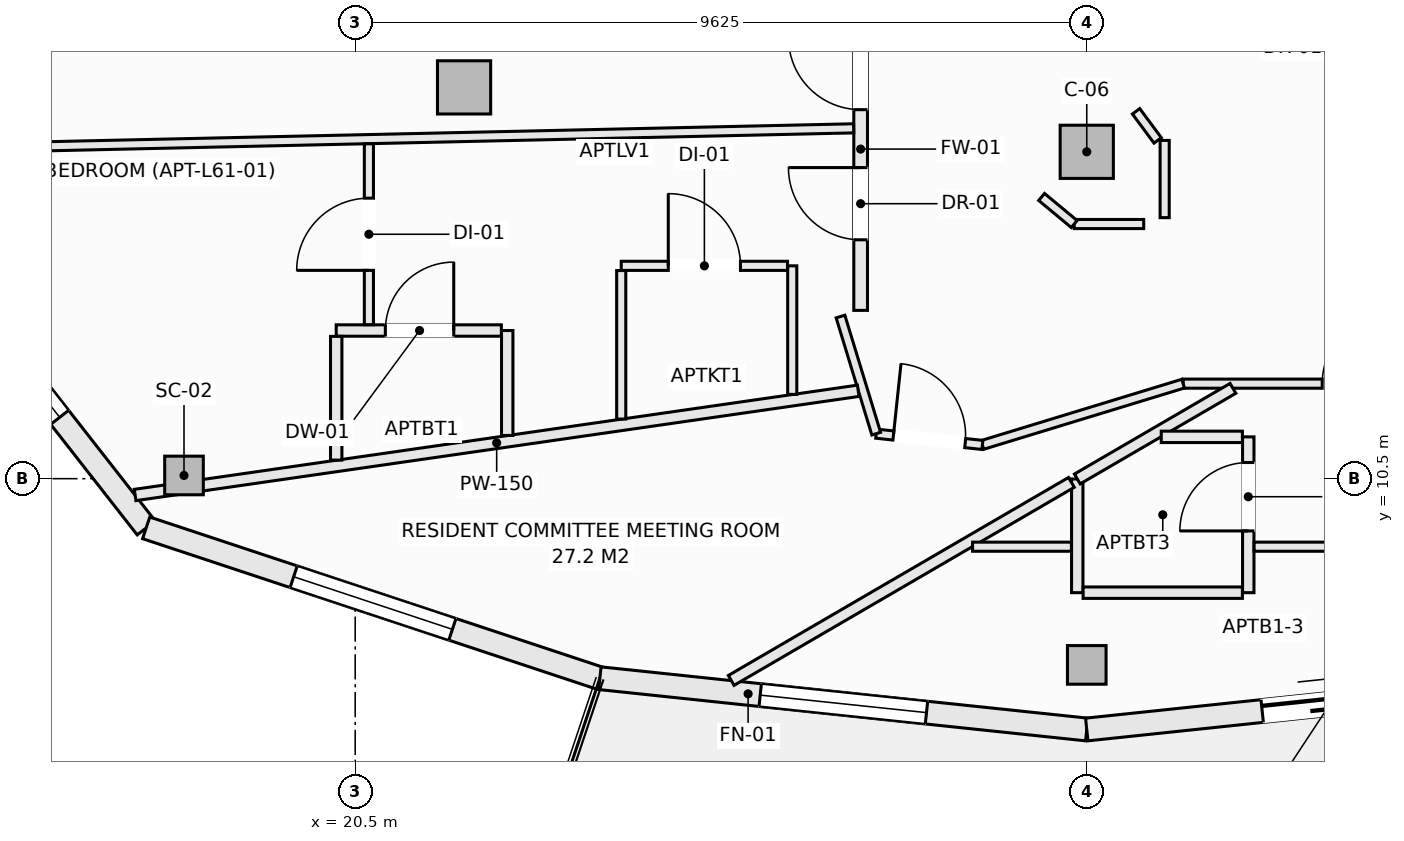
"""IFC4 building model, lengths in metres.
Left out: names, types, materials, properties, quantities, classifications, styles, units other than length and angle.
Written with IfcOpenShell. Run it as: python <this file> out.ifc"""

import sys

from ifc_helpers import new_model, si_unit, direction, frame, frame_2d, origin, origin_2d, place, context, subcontext, project, spatial, rectangle, hollow_rectangle, extrude, element, fill, save


model = new_model("IFC4")
c1 = context("Model", 3, precision=1e-05, world=origin(), true_north=direction((0.0, 1.0)))
c2 = subcontext(c1, "Body", "Model", "MODEL_VIEW")
j1 = project(units=[si_unit("LENGTHUNIT", "METRE"), si_unit("PLANEANGLEUNIT", "RADIAN")], contexts=[c1])
p1 = place(None, origin())
s1 = spatial("IfcSite", under=j1, at=p1, CompositionType="ELEMENT")
p2 = place(p1, origin())
s2 = spatial("IfcBuilding", under=s1, at=p2, CompositionType="ELEMENT")
p3 = place(p2, frame((0.0, 0.0, 229.4)))
s3 = spatial("IfcBuildingStorey", under=s2, at=p3, CompositionType="ELEMENT", Elevation=229.4)
for number, where, z_axis, x_axis in (
    (1, (18.247, 10.542, -0.27), (0.0, 0.0, 1.0), (1.0, 0.0, 0.0)),
    (2, (30.125, 8.05, -0.27), (0.0, 0.0, 1.0), (1.0, 0.0, 0.0)),
):
    element("IfcColumn", number, at=place(p3, frame(where, z_axis=z_axis, x_axis=x_axis)), inside=s3, PredefinedType="COLUMN", context=c2, shape_type="SweptSolid", body=[
        extrude(hollow_rectangle(XDim=0.508, YDim=0.508, WallThickness=0.019, at=origin_2d()), origin(), (0.0, 0.0, 1.0), 3.3),
    ])
for number, where, z_axis, x_axis in (
    (3, (21.932, 15.648, -0.27), (0.0, 0.0, 1.0), (1.0, 0.0, 0.0)),
    (4, (30.125, 14.8, -0.27), (0.0, 0.0, 1.0), (1.0, 0.0, 0.0)),
):
    element("IfcColumn", number, at=place(p3, frame(where, z_axis=z_axis, x_axis=x_axis)), inside=s3, PredefinedType="COLUMN", context=c2, shape_type="SweptSolid", body=[
        extrude(rectangle(XDim=0.7, YDim=0.7, at=origin_2d()), origin(), (0.0, 0.0, 1.0), 3.3),
    ])
p4 = place(p3, frame((14.117, 14.493, 0.0), z_axis=(0.0, 0.0, 1.0), x_axis=(0.616450126935, -0.787393955401, 0.0)))
e5 = element("IfcWall", 5, at=p4, inside=s3, PredefinedType="SOLIDWALL", context=c2, shape_type="SweptSolid", body=[
    extrude(rectangle(XDim=5.893, YDim=0.3, at=frame_2d((2.946, 0.0))), origin(), (0.0, 0.0, 1.0), 2.605),
])
p5 = place(p4, frame((1.846, 0.0, 0.72)))
e6 = element("IfcOpeningElement", 6, at=p5, cuts=e5, PredefinedType="OPENING", context=c2, shape_type="SweptSolid", body=[
    extrude(rectangle(XDim=2.2, YDim=1.65, at=frame_2d((1.1, 0.825))), frame((0.0, 0.16, 0.0), z_axis=(0.0, -1.0, 0.0), x_axis=(1.0, 0.0, 0.0)), (0.0, 0.0, 1.0), 0.32),
])
p6 = place(p3, frame((17.75, 9.853, 0.0), z_axis=(0.0, 0.0, 1.0), x_axis=(0.949240877604, -0.314550085495, 0.0)))
e7 = element("IfcWall", 7, at=p6, inside=s3, PredefinedType="SOLIDWALL", context=c2, shape_type="SweptSolid", body=[
    extrude(rectangle(XDim=6.288, YDim=0.3, at=frame_2d((3.144, 0.0))), origin(), (0.0, 0.0, 1.0), 2.605),
])
p7 = place(p6, frame((2.044, 0.0, 0.72)))
e8 = element("IfcOpeningElement", 8, at=p7, cuts=e7, PredefinedType="OPENING", context=c2, shape_type="SweptSolid", body=[
    extrude(rectangle(XDim=2.2, YDim=1.65, at=frame_2d((1.1, 0.825))), frame((0.0, 0.16, 0.0), z_axis=(0.0, -1.0, 0.0), x_axis=(1.0, 0.0, 0.0)), (0.0, 0.0, 1.0), 0.32),
])
p8 = place(p3, frame((23.719, 7.875, 0.0), z_axis=(0.0, 0.0, 1.0), x_axis=(0.994497142298, -0.104763705363, 0.0)))
e9 = element("IfcWall", 9, at=p8, inside=s3, PredefinedType="SOLIDWALL", context=c2, shape_type="SweptSolid", body=[
    extrude(rectangle(XDim=6.441, YDim=0.3, at=frame_2d((3.221, 0.0))), origin(), (0.0, 0.0, 1.0), 2.605),
])
p9 = place(p8, frame((2.121, 0.0, 0.72)))
e10 = element("IfcOpeningElement", 10, at=p9, cuts=e9, PredefinedType="OPENING", context=c2, shape_type="SweptSolid", body=[
    extrude(rectangle(XDim=2.2, YDim=1.65, at=frame_2d((1.1, 0.825))), frame((0.0, 0.16, 0.0), z_axis=(0.0, -1.0, 0.0), x_axis=(1.0, 0.0, 0.0)), (0.0, 0.0, 1.0), 0.32),
])
p10 = place(p3, frame((30.125, 7.2, 0.0), z_axis=(0.0, 0.0, 1.0), x_axis=(0.994497142298, 0.104763705363, 0.0)))
e11 = element("IfcWall", 11, at=p10, inside=s3, PredefinedType="SOLIDWALL", context=c2, shape_type="SweptSolid", body=[
    extrude(rectangle(XDim=6.441, YDim=0.3, at=frame_2d((3.221, 0.0))), origin(), (0.0, 0.0, 1.0), 2.605),
])
p11 = place(p10, frame((2.321, 0.0, 0.0)))
e12 = element("IfcOpeningElement", 12, at=p11, cuts=e11, PredefinedType="OPENING", context=c2, shape_type="SweptSolid", body=[
    extrude(rectangle(XDim=1.8, YDim=2.25, at=frame_2d((0.9, 1.125))), frame((0.0, 0.16, 0.0), z_axis=(0.0, -1.0, 0.0), x_axis=(1.0, 0.0, 0.0)), (0.0, 0.0, 1.0), 0.32),
])
p12 = place(p3, frame((27.15, 12.714, 0.0), z_axis=(0.0, 0.0, 1.0), x_axis=(0.0, 1.0, 0.0)))
e13 = element("IfcWall", 13, at=p12, inside=s3, PredefinedType="SOLIDWALL", context=c2, shape_type="SweptSolid", body=[
    extrude(rectangle(XDim=4.244, YDim=0.18, at=frame_2d((2.122, 0.0))), origin(), (0.0, 0.0, 1.0), 3.03),
])
p13 = place(p12, frame((0.928, 0.0, 0.0)))
e14 = element("IfcOpeningElement", 14, at=p13, cuts=e13, PredefinedType="OPENING", context=c2, shape_type="SweptSolid", body=[
    extrude(rectangle(XDim=0.95, YDim=2.1, at=frame_2d((0.475, 1.05))), frame((0.0, 0.1, 0.0), z_axis=(0.0, -1.0, 0.0), x_axis=(1.0, 0.0, 0.0)), (0.0, 0.0, 1.0), 0.2),
])
p14 = place(p12, frame((2.64, 0.0, 0.0)))
e15 = element("IfcOpeningElement", 15, at=p14, cuts=e13, PredefinedType="OPENING", context=c2, shape_type="SweptSolid", body=[
    extrude(rectangle(XDim=0.95, YDim=2.1, at=frame_2d((0.475, 1.05))), frame((0.0, 0.1, 0.0), z_axis=(0.0, -1.0, 0.0), x_axis=(1.0, 0.0, 0.0)), (0.0, 0.0, 1.0), 0.2),
])
p15 = place(p3, frame((30.0, 9.0, 0.0), z_axis=(0.0, 0.0, 1.0), x_axis=(0.0, 1.0, 0.0)))
e16 = element("IfcWall", 16, at=p15, inside=s3, PredefinedType="PARTITIONING", context=c2, shape_type="SweptSolid", body=[
    extrude(rectangle(XDim=1.496, YDim=0.15, at=frame_2d((0.748, 0.0))), origin(), (0.0, 0.0, 1.0), 2.77),
])
p16 = place(p3, frame((31.393, 11.75, 0.0), z_axis=(0.0, 0.0, 1.0), x_axis=(1.0, 0.0, 0.0)))
e17 = element("IfcWall", 17, at=p16, inside=s3, PredefinedType="PARTITIONING", context=c2, shape_type="SweptSolid", body=[
    extrude(rectangle(XDim=4.495, YDim=0.12, at=frame_2d((2.248, 0.0))), origin(), (0.0, 0.0, 1.0), 3.03),
])
p17 = place(p16, frame((1.83, 0.0, 0.0)))
e18 = element("IfcOpeningElement", 18, at=p17, cuts=e17, PredefinedType="OPENING", context=c2, shape_type="SweptSolid", body=[
    extrude(rectangle(XDim=0.95, YDim=2.1, at=frame_2d((0.475, 1.05))), frame((0.0, 0.07, 0.0), z_axis=(0.0, -1.0, 0.0), x_axis=(1.0, 0.0, 0.0)), (0.0, 0.0, 1.0), 0.14),
])
p18 = place(p3, frame((28.752, 10.944, 0.0), z_axis=(0.0, 0.0, 1.0), x_axis=(0.956462690075, 0.291854625618, 0.0)))
e19 = element("IfcWall", 19, at=p18, inside=s3, PredefinedType="PARTITIONING", context=c2, shape_type="SweptSolid", body=[
    extrude(rectangle(XDim=2.761, YDim=0.12, at=frame_2d((1.381, 0.0))), origin(), (0.0, 0.0, 1.0), 3.03),
])
p19 = place(p3, frame((27.355, 11.092, 0.0), z_axis=(0.0, 0.0, 1.0), x_axis=(0.994438591301, -0.105318033263, 0.0)))
e20 = element("IfcWall", 20, at=p19, inside=s3, PredefinedType="PARTITIONING", context=c2, shape_type="SweptSolid", body=[
    extrude(rectangle(XDim=1.405, YDim=0.12, at=frame_2d((0.702, 0.0))), origin(), (0.0, 0.0, 1.0), 3.03),
])
p20 = place(p19, frame((0.227, 0.0, 0.0)))
e21 = element("IfcOpeningElement", 21, at=p20, cuts=e20, PredefinedType="OPENING", context=c2, shape_type="SweptSolid", body=[
    extrude(rectangle(XDim=0.95, YDim=2.1, at=frame_2d((0.475, 1.05))), frame((0.0, 0.07, 0.0), z_axis=(0.0, -1.0, 0.0), x_axis=(1.0, 0.0, 0.0)), (0.0, 0.0, 1.0), 0.14),
])
p21 = place(p3, frame((26.885, 12.633, 0.0), z_axis=(0.0, 0.0, 1.0), x_axis=(0.291710302586, -0.956506716843, 0.0)))
e22 = element("IfcWall", 22, at=p21, inside=s3, PredefinedType="PARTITIONING", context=c2, shape_type="SweptSolid", body=[
    extrude(rectangle(XDim=1.611, YDim=0.12, at=frame_2d((0.806, 0.0))), origin(), (0.0, 0.0, 1.0), 3.03),
])
p22 = place(p3, frame((29.96, 13.85, 0.0), z_axis=(0.0, 0.0, 1.0), x_axis=(1.0, 0.0, 0.0)))
e23 = element("IfcWall", 23, at=p22, inside=s3, PredefinedType="PARTITIONING", context=c2, shape_type="SweptSolid", body=[
    extrude(rectangle(XDim=0.914, YDim=0.12, at=frame_2d((0.457, 0.0))), origin(), (0.0, 0.0, 1.0), 3.03),
])
p23 = place(p3, frame((31.15, 13.934, 0.0), z_axis=(0.0, 0.0, 1.0), x_axis=(0.0, 1.0, 0.0)))
e24 = element("IfcWall", 24, at=p23, inside=s3, PredefinedType="PARTITIONING", context=c2, shape_type="SweptSolid", body=[
    extrude(rectangle(XDim=1.016, YDim=0.12, at=frame_2d((0.508, 0.0))), origin(), (0.0, 0.0, 1.0), 3.03),
])
p24 = place(p3, frame((30.774, 15.333, 0.0), z_axis=(0.0, 0.0, 1.0), x_axis=(0.595814974861, -0.803121731577, 0.0)))
e25 = element("IfcWall", 25, at=p24, inside=s3, PredefinedType="PARTITIONING", context=c2, shape_type="SweptSolid", body=[
    extrude(rectangle(XDim=0.477, YDim=0.12, at=frame_2d((0.239, 0.0))), origin(), (0.0, 0.0, 1.0), 3.03),
])
p25 = place(p3, frame((29.531, 14.206, 0.0), z_axis=(0.0, 0.0, 1.0), x_axis=(0.7695479554, -0.638589026166, 0.0)))
e26 = element("IfcWall", 26, at=p25, inside=s3, PredefinedType="PARTITIONING", context=c2, shape_type="SweptSolid", body=[
    extrude(rectangle(XDim=0.557, YDim=0.12, at=frame_2d((0.279, 0.0))), origin(), (0.0, 0.0, 1.0), 3.03),
])
p26 = place(p3, frame((13.8, 14.814, 0.0), z_axis=(0.0, 0.0, 1.0), x_axis=(0.999752677802, 0.022239227231, 0.0)))
e27 = element("IfcWall", 27, at=p26, inside=s3, PredefinedType="PARTITIONING", context=c2, shape_type="SweptSolid", body=[
    extrude(rectangle(XDim=13.261, YDim=0.12, at=frame_2d((6.631, 0.0))), origin(), (0.0, 0.0, 1.0), 2.478),
])
p27 = place(p3, frame((17.604, 10.285, 0.0), z_axis=(0.0, 0.0, 1.0), x_axis=(0.989781675617, 0.142591144933, 0.0)))
e28 = element("IfcWall", 28, at=p27, inside=s3, PredefinedType="PARTITIONING", context=c2, shape_type="SweptSolid", body=[
    extrude(rectangle(XDim=9.612, YDim=0.15, at=frame_2d((4.806, 0.0))), origin(), (0.0, 0.0, 1.0), 2.605),
])
p28 = place(p3, frame((26.25, 11.609, 0.0), z_axis=(0.0, 0.0, 1.0), x_axis=(0.0, 1.0, 0.0)))
e29 = element("IfcWall", 29, at=p28, inside=s3, PredefinedType="PARTITIONING", context=c2, shape_type="SweptSolid", body=[
    extrude(rectangle(XDim=1.691, YDim=0.12, at=frame_2d((0.846, 0.0))), origin(), (0.0, 0.0, 1.0), 3.03),
])
p29 = place(p3, frame((24.0, 13.3, 0.0), z_axis=(0.0, 0.0, 1.0), x_axis=(1.0, 0.0, 0.0)))
e30 = element("IfcWall", 30, at=p29, inside=s3, PredefinedType="PARTITIONING", context=c2, shape_type="SweptSolid", body=[
    extrude(rectangle(XDim=2.188, YDim=0.12, at=frame_2d((1.094, 0.0))), origin(), (0.0, 0.0, 1.0), 3.03),
])
p30 = place(p29, frame((0.619, 0.0, 0.0)))
e31 = element("IfcOpeningElement", 31, at=p30, cuts=e30, PredefinedType="OPENING", context=c2, shape_type="SweptSolid", body=[
    extrude(rectangle(XDim=0.95, YDim=2.1, at=frame_2d((0.475, 1.05))), frame((0.0, 0.07, 0.0), z_axis=(0.0, -1.0, 0.0), x_axis=(1.0, 0.0, 0.0)), (0.0, 0.0, 1.0), 0.14),
])
p31 = place(p3, frame((24.0, 11.285, 0.0), z_axis=(0.0, 0.0, 1.0), x_axis=(0.0, 1.0, 0.0)))
e32 = element("IfcWall", 32, at=p31, inside=s3, PredefinedType="PARTITIONING", context=c2, shape_type="SweptSolid", body=[
    extrude(rectangle(XDim=1.953, YDim=0.12, at=frame_2d((0.977, 0.0))), origin(), (0.0, 0.0, 1.0), 3.03),
])
p32 = place(p3, frame((22.5, 11.069, 0.0), z_axis=(0.0, 0.0, 1.0), x_axis=(0.0, 1.0, 0.0)))
e33 = element("IfcWall", 33, at=p32, inside=s3, PredefinedType="PARTITIONING", context=c2, shape_type="SweptSolid", body=[
    extrude(rectangle(XDim=1.38, YDim=0.15, at=frame_2d((0.69, 0.0))), origin(), (0.0, 0.0, 1.0), 3.03),
])
p33 = place(p3, frame((20.25, 12.449, 0.0), z_axis=(0.0, 0.0, 1.0), x_axis=(1.0, 0.0, 0.0)))
e34 = element("IfcWall", 34, at=p33, inside=s3, PredefinedType="PARTITIONING", context=c2, shape_type="SweptSolid", body=[
    extrude(rectangle(XDim=2.173, YDim=0.15, at=frame_2d((1.086, 0.0))), origin(), (0.0, 0.0, 1.0), 3.03),
])
p34 = place(p33, frame((0.646, 0.0, 0.0)))
e35 = element("IfcOpeningElement", 35, at=p34, cuts=e34, PredefinedType="OPENING", context=c2, shape_type="SweptSolid", body=[
    extrude(rectangle(XDim=0.9, YDim=2.1, at=frame_2d((0.45, 1.05))), frame((0.0, 0.085, 0.0), z_axis=(0.0, -1.0, 0.0), x_axis=(1.0, 0.0, 0.0)), (0.0, 0.0, 1.0), 0.17),
])
p35 = place(p3, frame((20.68, 12.526, 0.0), z_axis=(0.0, 0.0, 1.0), x_axis=(0.0, 1.0, 0.0)))
e36 = element("IfcWall", 36, at=p35, inside=s3, PredefinedType="PARTITIONING", context=c2, shape_type="SweptSolid", body=[
    extrude(rectangle(XDim=2.379, YDim=0.12, at=frame_2d((1.189, 0.0))), origin(), (0.0, 0.0, 1.0), 2.478),
])
p36 = place(p35, frame((0.715, 0.0, 0.0)))
e37 = element("IfcOpeningElement", 37, at=p36, cuts=e36, PredefinedType="OPENING", context=c2, shape_type="SweptSolid", body=[
    extrude(rectangle(XDim=0.95, YDim=2.1, at=frame_2d((0.475, 1.05))), frame((0.0, 0.07, 0.0), z_axis=(0.0, -1.0, 0.0), x_axis=(1.0, 0.0, 0.0)), (0.0, 0.0, 1.0), 0.14),
])
p37 = place(p3, frame((20.25, 10.744, 0.0), z_axis=(0.0, 0.0, 1.0), x_axis=(0.0, 1.0, 0.0)))
e38 = element("IfcWall", 38, at=p37, inside=s3, PredefinedType="PARTITIONING", context=c2, shape_type="SweptSolid", body=[
    extrude(rectangle(XDim=1.628, YDim=0.15, at=frame_2d((0.814, 0.0))), origin(), (0.0, 0.0, 1.0), 3.03),
])
p38 = place(p3, frame((25.447, 7.846, 0.0), z_axis=(0.0, 0.0, 1.0), x_axis=(0.864279409289, 0.503012030353, 0.0)))
e39 = element("IfcWall", 39, at=p38, inside=s3, PredefinedType="PARTITIONING", context=c2, shape_type="SweptSolid", body=[
    extrude(rectangle(XDim=5.179, YDim=0.15, at=frame_2d((2.59, 0.0))), origin(), (0.0, 0.0, 1.0), 3.03),
])
p39 = place(p3, frame((30.0, 10.496, 0.0), z_axis=(0.0, 0.0, 1.0), x_axis=(0.864297850125, 0.50298034382, 0.0)))
e40 = element("IfcWall", 40, at=p39, inside=s3, PredefinedType="PARTITIONING", context=c2, shape_type="SweptSolid", body=[
    extrude(rectangle(XDim=2.37, YDim=0.15, at=frame_2d((1.185, 0.0))), origin(), (0.0, 0.0, 1.0), 3.03),
])
p40 = place(p3, frame((32.25, 9.0, 0.0), z_axis=(0.0, 0.0, 1.0), x_axis=(0.0, 1.0, 0.0)))
e41 = element("IfcWall", 41, at=p40, inside=s3, PredefinedType="PARTITIONING", context=c2, shape_type="SweptSolid", body=[
    extrude(rectangle(XDim=2.05, YDim=0.15, at=frame_2d((1.025, 0.0))), origin(), (0.0, 0.0, 1.0), 3.03),
])
p41 = place(p40, frame((0.812, 0.0, 0.0)))
e42 = element("IfcOpeningElement", 42, at=p41, cuts=e41, PredefinedType="OPENING", context=c2, shape_type="SweptSolid", body=[
    extrude(rectangle(XDim=0.9, YDim=2.1, at=frame_2d((0.45, 1.05))), frame((0.0, 0.085, 0.0), z_axis=(0.0, -1.0, 0.0), x_axis=(1.0, 0.0, 0.0)), (0.0, 0.0, 1.0), 0.17),
])
p42 = place(p3, frame((31.105, 11.05, 0.0), z_axis=(0.0, 0.0, 1.0), x_axis=(1.0, 0.0, 0.0)))
e43 = element("IfcWall", 43, at=p42, inside=s3, PredefinedType="PARTITIONING", context=c2, shape_type="SweptSolid", body=[
    extrude(rectangle(XDim=1.068, YDim=0.15, at=frame_2d((0.534, 0.0))), origin(), (0.0, 0.0, 1.0), 3.03),
])
p43 = place(p3, frame((28.623, 9.605, 0.0), z_axis=(0.0, 0.0, 1.0), x_axis=(1.0, 0.0, 0.0)))
e44 = element("IfcWall", 44, at=p43, inside=s3, PredefinedType="PARTITIONING", context=c2, shape_type="SweptSolid", body=[
    extrude(rectangle(XDim=1.3, YDim=0.12, at=frame_2d((0.65, 0.0))), origin(), (0.0, 0.0, 1.0), 3.03),
])
p44 = place(p3, frame((32.327, 9.605, 0.0), z_axis=(0.0, 0.0, 1.0), x_axis=(1.0, 0.0, 0.0)))
e45 = element("IfcWall", 45, at=p44, inside=s3, PredefinedType="PARTITIONING", context=c2, shape_type="SweptSolid", body=[
    extrude(rectangle(XDim=6.611, YDim=0.12, at=frame_2d((3.306, 0.0))), origin(), (0.0, 0.0, 1.0), 2.605),
])
p45 = place(p44, frame((2.831, 0.0, 0.0)))
e46 = element("IfcOpeningElement", 46, at=p45, cuts=e45, PredefinedType="OPENING", context=c2, shape_type="SweptSolid", body=[
    extrude(rectangle(XDim=0.95, YDim=2.1, at=frame_2d((0.475, 1.05))), frame((0.0, 0.07, 0.0), z_axis=(0.0, -1.0, 0.0), x_axis=(1.0, 0.0, 0.0)), (0.0, 0.0, 1.0), 0.14),
])
p46 = place(p3, frame((30.077, 9.0, 0.0), z_axis=(0.0, 0.0, 1.0), x_axis=(1.0, 0.0, 0.0)))
e47 = element("IfcWall", 47, at=p46, inside=s3, PredefinedType="PARTITIONING", context=c2, shape_type="SweptSolid", body=[
    extrude(rectangle(XDim=2.096, YDim=0.15, at=frame_2d((1.048, 0.0))), origin(), (0.0, 0.0, 1.0), 3.03),
])
p47 = place(p5, origin())
e48 = element("IfcWindow", 48, at=p47, inside=s3, PartitioningType="SINGLE_PANEL", PredefinedType="WINDOW", context=c2, shape_type="SweptSolid", body=[
    extrude(rectangle(XDim=2.2, YDim=1.65, at=frame_2d((1.1, 0.825))), frame((0.0, 0.03, 0.0), z_axis=(0.0, -1.0, 0.0), x_axis=(1.0, 0.0, 0.0)), (0.0, 0.0, 1.0), 0.06),
])
fill(e6, e48)
p48 = place(p7, origin())
e49 = element("IfcWindow", 49, at=p48, inside=s3, PartitioningType="SINGLE_PANEL", PredefinedType="WINDOW", context=c2, shape_type="SweptSolid", body=[
    extrude(rectangle(XDim=2.2, YDim=1.65, at=frame_2d((1.1, 0.825))), frame((0.0, 0.03, 0.0), z_axis=(0.0, -1.0, 0.0), x_axis=(1.0, 0.0, 0.0)), (0.0, 0.0, 1.0), 0.06),
])
fill(e8, e49)
p49 = place(p9, origin())
e50 = element("IfcWindow", 50, at=p49, inside=s3, PartitioningType="SINGLE_PANEL", PredefinedType="WINDOW", context=c2, shape_type="SweptSolid", body=[
    extrude(rectangle(XDim=2.2, YDim=1.65, at=frame_2d((1.1, 0.825))), frame((0.0, 0.03, 0.0), z_axis=(0.0, -1.0, 0.0), x_axis=(1.0, 0.0, 0.0)), (0.0, 0.0, 1.0), 0.06),
])
fill(e10, e50)
p50 = place(p11, frame((1.8, 0.0, 0.0), z_axis=(0.0, 0.0, 1.0), x_axis=(-1.0, 0.0, 0.0)))
e51 = element("IfcDoor", 51, at=p50, inside=s3, OperationType="SLIDING_TO_LEFT", PredefinedType="DOOR", context=c2, shape_type="SweptSolid", body=[
    extrude(rectangle(XDim=1.8, YDim=2.25, at=frame_2d((0.9, 1.125))), frame((0.0, 0.025, 0.0), z_axis=(0.0, -1.0, 0.0), x_axis=(1.0, 0.0, 0.0)), (0.0, 0.0, 1.0), 0.05),
])
fill(e12, e51)
p51 = place(p13, origin())
e52 = element("IfcDoor", 52, at=p51, inside=s3, OperationType="SINGLE_SWING_RIGHT", PredefinedType="DOOR", context=c2, shape_type="SweptSolid", body=[
    extrude(rectangle(XDim=0.95, YDim=2.1, at=frame_2d((0.475, 1.05))), frame((0.0, 0.025, 0.0), z_axis=(0.0, -1.0, 0.0), x_axis=(1.0, 0.0, 0.0)), (0.0, 0.0, 1.0), 0.05),
])
fill(e14, e52)
p52 = place(p20, origin())
e53 = element("IfcDoor", 53, at=p52, inside=s3, OperationType="SINGLE_SWING_LEFT", PredefinedType="DOOR", context=c2, shape_type="SweptSolid", body=[
    extrude(rectangle(XDim=0.95, YDim=2.1, at=frame_2d((0.475, 1.05))), frame((0.0, 0.025, 0.0), z_axis=(0.0, -1.0, 0.0), x_axis=(1.0, 0.0, 0.0)), (0.0, 0.0, 1.0), 0.05),
])
fill(e21, e53)
p53 = place(p17, origin())
e54 = element("IfcDoor", 54, at=p53, inside=s3, OperationType="SINGLE_SWING_RIGHT", PredefinedType="DOOR", context=c2, shape_type="SweptSolid", body=[
    extrude(rectangle(XDim=0.95, YDim=2.1, at=frame_2d((0.475, 1.05))), frame((0.0, 0.025, 0.0), z_axis=(0.0, -1.0, 0.0), x_axis=(1.0, 0.0, 0.0)), (0.0, 0.0, 1.0), 0.05),
])
fill(e18, e54)
p54 = place(p14, origin())
e55 = element("IfcDoor", 55, at=p54, inside=s3, OperationType="SINGLE_SWING_RIGHT", PredefinedType="DOOR", context=c2, shape_type="SweptSolid", body=[
    extrude(rectangle(XDim=0.95, YDim=2.1, at=frame_2d((0.475, 1.05))), frame((0.0, 0.025, 0.0), z_axis=(0.0, -1.0, 0.0), x_axis=(1.0, 0.0, 0.0)), (0.0, 0.0, 1.0), 0.05),
])
fill(e15, e55)
p55 = place(p30, origin())
e56 = element("IfcDoor", 56, at=p55, inside=s3, OperationType="SINGLE_SWING_LEFT", PredefinedType="DOOR", context=c2, shape_type="SweptSolid", body=[
    extrude(rectangle(XDim=0.95, YDim=2.1, at=frame_2d((0.475, 1.05))), frame((0.0, 0.025, 0.0), z_axis=(0.0, -1.0, 0.0), x_axis=(1.0, 0.0, 0.0)), (0.0, 0.0, 1.0), 0.05),
])
fill(e31, e56)
p56 = place(p34, origin())
e57 = element("IfcDoor", 57, at=p56, inside=s3, OperationType="SINGLE_SWING_RIGHT", PredefinedType="DOOR", context=c2, shape_type="SweptSolid", body=[
    extrude(rectangle(XDim=0.9, YDim=2.1, at=frame_2d((0.45, 1.05))), frame((0.0, 0.025, 0.0), z_axis=(0.0, -1.0, 0.0), x_axis=(1.0, 0.0, 0.0)), (0.0, 0.0, 1.0), 0.05),
])
fill(e35, e57)
p57 = place(p36, origin())
e58 = element("IfcDoor", 58, at=p57, inside=s3, OperationType="SINGLE_SWING_LEFT", PredefinedType="DOOR", context=c2, shape_type="SweptSolid", body=[
    extrude(rectangle(XDim=0.95, YDim=2.1, at=frame_2d((0.475, 1.05))), frame((0.0, 0.025, 0.0), z_axis=(0.0, -1.0, 0.0), x_axis=(1.0, 0.0, 0.0)), (0.0, 0.0, 1.0), 0.05),
])
fill(e37, e58)
p58 = place(p41, origin())
e59 = element("IfcDoor", 59, at=p58, inside=s3, OperationType="SINGLE_SWING_LEFT", PredefinedType="DOOR", context=c2, shape_type="SweptSolid", body=[
    extrude(rectangle(XDim=0.9, YDim=2.1, at=frame_2d((0.45, 1.05))), frame((0.0, 0.025, 0.0), z_axis=(0.0, -1.0, 0.0), x_axis=(1.0, 0.0, 0.0)), (0.0, 0.0, 1.0), 0.05),
])
fill(e42, e59)
save(model, sys.argv[1])
